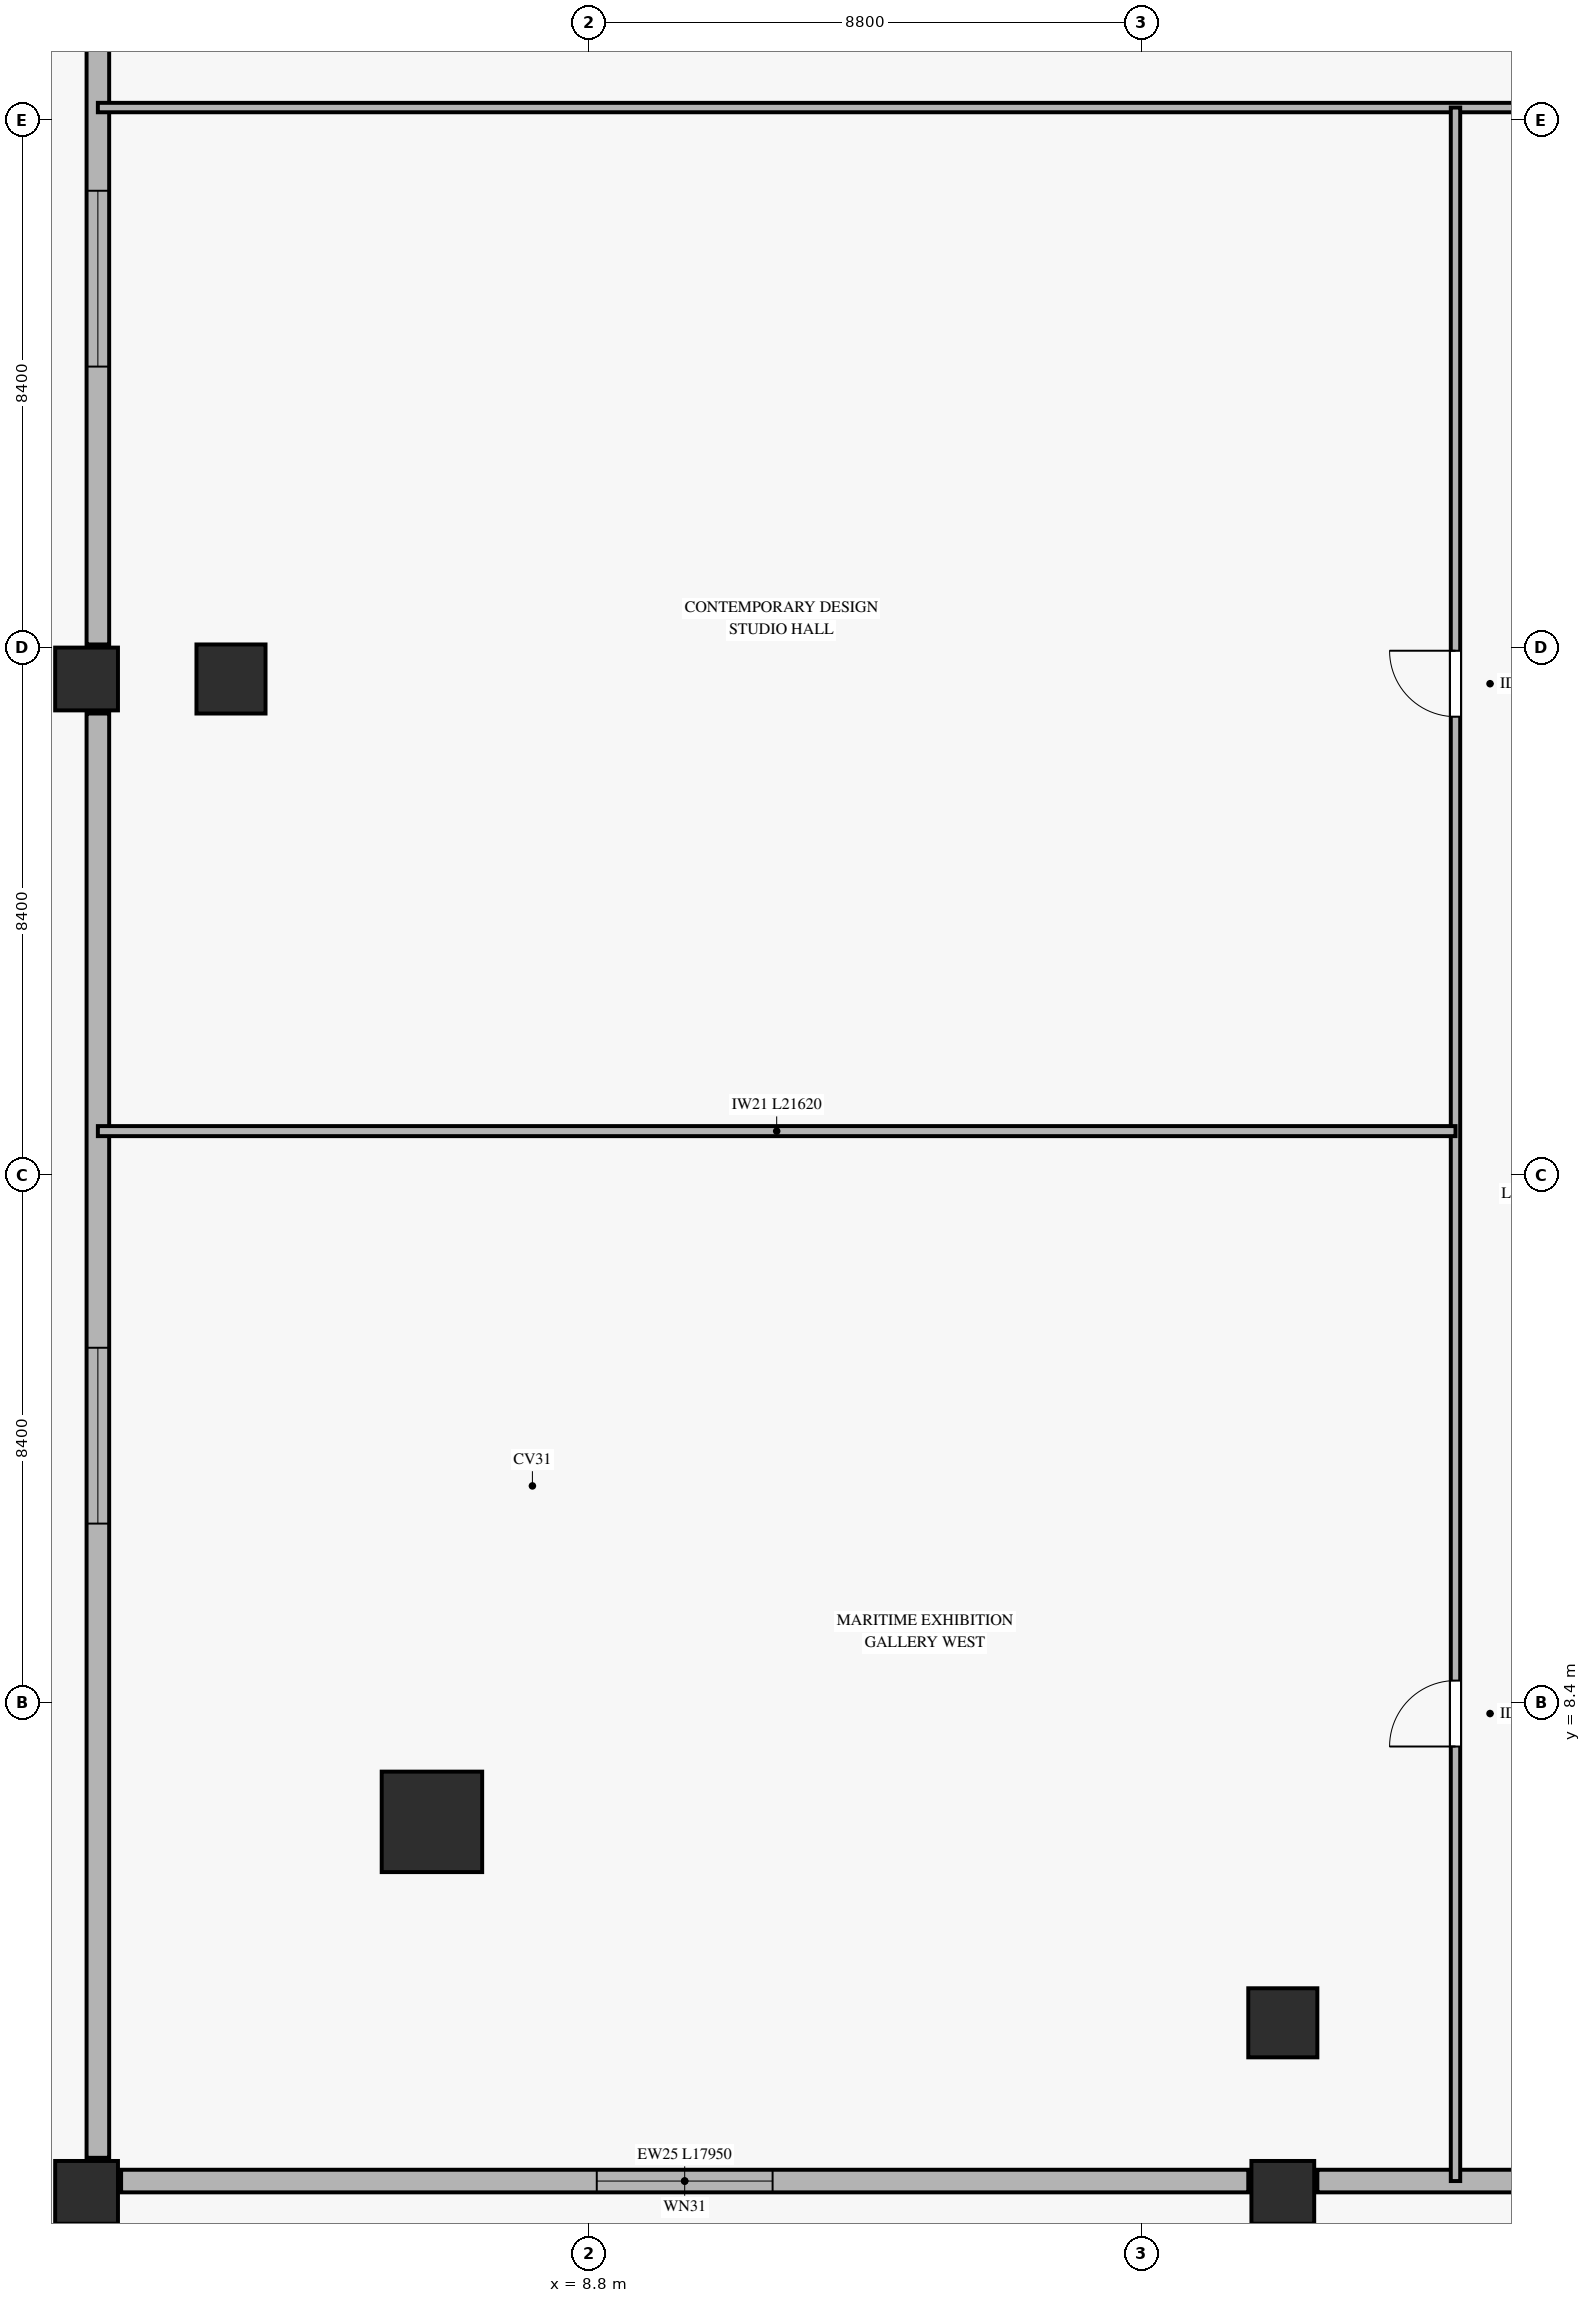
"""IFC4 building model, lengths in metres.
Left out: names, types, materials, properties, quantities, classifications, styles, units other than length and angle.
Written with IfcOpenShell. Run it as: python <this file> out.ifc"""

import sys

from ifc_helpers import new_model, si_unit, direction, frame, frame_2d, origin, origin_2d, place, context, subcontext, project, spatial, rectangle, hollow_rectangle, extrude, source, transform, mapped, element, fill, save


model = new_model("IFC4")
c1 = context("Model", 3, precision=1e-05, world=origin(), true_north=direction((0.0, 1.0)))
c2 = subcontext(c1, "Body", "Model", "MODEL_VIEW")
j1 = project(units=[si_unit("LENGTHUNIT", "METRE"), si_unit("PLANEANGLEUNIT", "RADIAN")], contexts=[c1])
p1 = place(None, origin())
s1 = spatial("IfcSite", under=j1, at=p1, CompositionType="ELEMENT")
p2 = place(p1, origin())
s2 = spatial("IfcBuilding", under=s1, at=p2, CompositionType="ELEMENT")
p3 = place(p2, frame((0.0, 0.0, 10.4)))
s3 = spatial("IfcBuildingStorey", under=s2, at=p3, CompositionType="ELEMENT", Elevation=10.4)
m1 = source(origin(), c2, "Body", "SweptSolid", [
    extrude(hollow_rectangle(XDim=1.6, YDim=1.6, WallThickness=0.075, at=origin_2d()), origin(), (0.0, 0.0, 1.0), 4.54),
])
p4 = place(p3, frame((6.3, 6.5, 0.0), z_axis=(0.0, 0.0, 1.0), x_axis=(1.0, 0.0, 0.0)))
e1 = element("IfcColumn", 1, at=p4, inside=s3, PredefinedType="COLUMN", context=c2, shape_type="MappedRepresentation", body=[
    mapped(m1, transform((0.0, 0.0, 0.0), x_axis=(1.0, 0.0, 0.0), y_axis=(0.0, 1.0, 0.0), z_axis=(0.0, 0.0, 1.0), scale=1.0)),
])
m2 = source(origin(), c2, "Body", "SweptSolid", [
    extrude(hollow_rectangle(XDim=1.1, YDim=1.1, WallThickness=0.05, at=origin_2d()), origin(), (0.0, 0.0, 1.0), 4.54),
])
for number, where, z_axis, x_axis in (
    (2, (19.85, 3.3, 0.0), (0.0, 0.0, 1.0), (1.0, 0.0, 0.0)),
    (3, (3.1, 24.7, 0.0), (0.0, 0.0, 1.0), (1.0, 0.0, 0.0)),
):
    element("IfcColumn", number, at=place(p3, frame(where, z_axis=z_axis, x_axis=x_axis)), inside=s3, PredefinedType="COLUMN", context=c2, shape_type="MappedRepresentation", body=[
        mapped(m2, transform((0.0, 0.0, 0.0), x_axis=(1.0, 0.0, 0.0), y_axis=(0.0, 1.0, 0.0), z_axis=(0.0, 0.0, 1.0), scale=1.0)),
    ])
m3 = source(origin(), c2, "Body", "SweptSolid", [
    extrude(hollow_rectangle(XDim=1.0, YDim=1.0, WallThickness=0.045, at=origin_2d()), origin(), (0.0, 0.0, 1.0), 4.54),
])
for number, where, z_axis, x_axis in (
    (4, (0.8, 0.6, 0.0), (0.0, 0.0, 1.0), (1.0, 0.0, 0.0)),
    (5, (19.85, 0.6, 0.0), (0.0, 0.0, 1.0), (1.0, 0.0, 0.0)),
    (6, (0.8, 24.7, 0.0), (0.0, 0.0, 1.0), (1.0, 0.0, 0.0)),
):
    element("IfcColumn", number, at=place(p3, frame(where, z_axis=z_axis, x_axis=x_axis)), inside=s3, PredefinedType="COLUMN", context=c2, shape_type="MappedRepresentation", body=[
        mapped(m3, transform((0.0, 0.0, 0.0), x_axis=(1.0, 0.0, 0.0), y_axis=(0.0, 1.0, 0.0), z_axis=(0.0, 0.0, 1.0), scale=1.0)),
    ])
p5 = place(p3, frame((1.35, 0.78, 0.0), z_axis=(0.0, 0.0, 1.0), x_axis=(1.0, 0.0, 0.0)))
e7 = element("IfcWall", 7, at=p5, inside=s3, PredefinedType="SOLIDWALL", context=c2, shape_type="SweptSolid", body=[
    extrude(rectangle(XDim=17.95, YDim=0.36, at=frame_2d((8.975, 0.0))), origin(), (0.0, 0.0, 1.0), 3.42),
])
p6 = place(p5, frame((7.575, 0.0, 0.72)))
e8 = element("IfcOpeningElement", 8, at=p6, cuts=e7, PredefinedType="OPENING", context=c2, shape_type="SweptSolid", body=[
    extrude(rectangle(XDim=2.8, YDim=2.0, at=frame_2d((1.4, 1.0))), frame((0.0, 0.19, 0.0), z_axis=(0.0, -1.0, 0.0), x_axis=(1.0, 0.0, 0.0)), (0.0, 0.0, 1.0), 0.38),
])
p7 = place(p3, frame((20.4, 0.78, 0.0), z_axis=(0.0, 0.0, 1.0), x_axis=(1.0, 0.0, 0.0)))
e9 = element("IfcWall", 9, at=p7, inside=s3, PredefinedType="SOLIDWALL", context=c2, shape_type="SweptSolid", body=[
    extrude(rectangle(XDim=9.85, YDim=0.36, at=frame_2d((4.925, 0.0))), origin(), (0.0, 0.0, 1.0), 3.42),
])
p8 = place(p7, frame((5.2, 0.0, 0.72)))
e10 = element("IfcOpeningElement", 10, at=p8, cuts=e9, PredefinedType="OPENING", context=c2, shape_type="SweptSolid", body=[
    extrude(rectangle(XDim=2.8, YDim=2.0, at=frame_2d((1.4, 1.0))), frame((0.0, 0.19, 0.0), z_axis=(0.0, -1.0, 0.0), x_axis=(1.0, 0.0, 0.0)), (0.0, 0.0, 1.0), 0.38),
])
p9 = place(p3, frame((0.98, 1.15, 0.0), z_axis=(0.0, 0.0, 1.0), x_axis=(0.0, 1.0, 0.0)))
e11 = element("IfcWall", 11, at=p9, inside=s3, PredefinedType="SOLIDWALL", context=c2, shape_type="SweptSolid", body=[
    extrude(rectangle(XDim=23.0, YDim=0.36, at=frame_2d((11.5, 0.0))), origin(), (0.0, 0.0, 1.0), 3.42),
])
p10 = place(p9, frame((10.1, 0.0, 0.72)))
e12 = element("IfcOpeningElement", 12, at=p10, cuts=e11, PredefinedType="OPENING", context=c2, shape_type="SweptSolid", body=[
    extrude(rectangle(XDim=2.8, YDim=2.0, at=frame_2d((1.4, 1.0))), frame((0.0, 0.19, 0.0), z_axis=(0.0, -1.0, 0.0), x_axis=(1.0, 0.0, 0.0)), (0.0, 0.0, 1.0), 0.38),
])
p11 = place(p3, frame((0.98, 25.25, 0.0), z_axis=(0.0, 0.0, 1.0), x_axis=(0.0, 1.0, 0.0)))
e13 = element("IfcWall", 13, at=p11, inside=s3, PredefinedType="SOLIDWALL", context=c2, shape_type="SweptSolid", body=[
    extrude(rectangle(XDim=11.65, YDim=0.36, at=frame_2d((5.825, 0.0))), origin(), (0.0, 0.0, 1.0), 3.42),
])
p12 = place(p11, frame((4.425, 0.0, 0.72)))
e14 = element("IfcOpeningElement", 14, at=p12, cuts=e13, PredefinedType="OPENING", context=c2, shape_type="SweptSolid", body=[
    extrude(rectangle(XDim=2.8, YDim=2.0, at=frame_2d((1.4, 1.0))), frame((0.0, 0.19, 0.0), z_axis=(0.0, -1.0, 0.0), x_axis=(1.0, 0.0, 0.0)), (0.0, 0.0, 1.0), 0.38),
])
p13 = place(p3, frame((0.98, 33.8, 0.0), z_axis=(0.0, 0.0, 1.0), x_axis=(1.0, 0.0, 0.0)))
e15 = element("IfcWall", 15, at=p13, inside=s3, PredefinedType="PARTITIONING", context=c2, shape_type="SweptSolid", body=[
    extrude(rectangle(XDim=68.44, YDim=0.15, at=frame_2d((34.22, 0.0))), origin(), (0.0, 0.0, 1.0), 3.425),
])
p14 = place(p13, frame((25.27, 0.0, 0.0)))
e16 = element("IfcOpeningElement", 16, at=p14, cuts=e15, PredefinedType="OPENING", context=c2, shape_type="SweptSolid", body=[
    extrude(rectangle(XDim=1.05, YDim=2.15, at=frame_2d((0.525, 1.075))), frame((0.0, 0.085, 0.0), z_axis=(0.0, -1.0, 0.0), x_axis=(1.0, 0.0, 0.0)), (0.0, 0.0, 1.0), 0.17),
])
p15 = place(p13, frame((38.22, 0.0, 0.0)))
e17 = element("IfcOpeningElement", 17, at=p15, cuts=e15, PredefinedType="OPENING", context=c2, shape_type="SweptSolid", body=[
    extrude(rectangle(XDim=1.05, YDim=2.15, at=frame_2d((0.525, 1.075))), frame((0.0, 0.085, 0.0), z_axis=(0.0, -1.0, 0.0), x_axis=(1.0, 0.0, 0.0)), (0.0, 0.0, 1.0), 0.17),
])
p16 = place(p3, frame((22.6, 0.78, 0.0), z_axis=(0.0, 0.0, 1.0), x_axis=(0.0, 1.0, 0.0)))
e18 = element("IfcWall", 18, at=p16, inside=s3, PredefinedType="PARTITIONING", context=c2, shape_type="SweptSolid", body=[
    extrude(rectangle(XDim=33.02, YDim=0.15, at=frame_2d((16.51, 0.0))), origin(), (0.0, 0.0, 1.0), 3.425),
])
p17 = place(p16, frame((6.92, 0.0, 0.0)))
e19 = element("IfcOpeningElement", 19, at=p17, cuts=e18, PredefinedType="OPENING", context=c2, shape_type="SweptSolid", body=[
    extrude(rectangle(XDim=1.05, YDim=2.15, at=frame_2d((0.525, 1.075))), frame((0.0, 0.085, 0.0), z_axis=(0.0, -1.0, 0.0), x_axis=(1.0, 0.0, 0.0)), (0.0, 0.0, 1.0), 0.17),
])
p18 = place(p16, frame((23.32, 0.0, 0.0)))
e20 = element("IfcOpeningElement", 20, at=p18, cuts=e18, PredefinedType="OPENING", context=c2, shape_type="SweptSolid", body=[
    extrude(rectangle(XDim=1.05, YDim=2.15, at=frame_2d((0.525, 1.075))), frame((0.0, 0.085, 0.0), z_axis=(0.0, -1.0, 0.0), x_axis=(1.0, 0.0, 0.0)), (0.0, 0.0, 1.0), 0.17),
])
p19 = place(p3, frame((0.98, 17.5, 0.0), z_axis=(0.0, 0.0, 1.0), x_axis=(1.0, 0.0, 0.0)))
e21 = element("IfcWall", 21, at=p19, inside=s3, PredefinedType="PARTITIONING", context=c2, shape_type="SweptSolid", body=[
    extrude(rectangle(XDim=21.62, YDim=0.16, at=frame_2d((10.81, 0.0))), origin(), (0.0, 0.0, 1.0), 3.425),
])
m4 = source(origin(), c2, "Body", "SweptSolid", [
    extrude(rectangle(XDim=2.8, YDim=2.0, at=frame_2d((1.4, 1.0))), frame((0.0, 0.03, 0.0), z_axis=(0.0, -1.0, 0.0), x_axis=(1.0, 0.0, 0.0)), (0.0, 0.0, 1.0), 0.06),
])
p20 = place(p6, origin())
e22 = element("IfcWindow", 22, at=p20, inside=s3, PartitioningType="SINGLE_PANEL", PredefinedType="WINDOW", context=c2, shape_type="MappedRepresentation", body=[
    mapped(m4, transform((0.0, 0.0, 0.0), x_axis=(1.0, 0.0, 0.0), y_axis=(0.0, 1.0, 0.0), z_axis=(0.0, 0.0, 1.0), scale=1.0)),
])
fill(e8, e22)
p21 = place(p10, origin())
e23 = element("IfcWindow", 23, at=p21, inside=s3, PartitioningType="SINGLE_PANEL", PredefinedType="WINDOW", context=c2, shape_type="MappedRepresentation", body=[
    mapped(m4, transform((0.0, 0.0, 0.0), x_axis=(1.0, 0.0, 0.0), y_axis=(0.0, 1.0, 0.0), z_axis=(0.0, 0.0, 1.0), scale=1.0)),
])
fill(e12, e23)
p22 = place(p12, origin())
e24 = element("IfcWindow", 24, at=p22, inside=s3, PartitioningType="SINGLE_PANEL", PredefinedType="WINDOW", context=c2, shape_type="MappedRepresentation", body=[
    mapped(m4, transform((0.0, 0.0, 0.0), x_axis=(1.0, 0.0, 0.0), y_axis=(0.0, 1.0, 0.0), z_axis=(0.0, 0.0, 1.0), scale=1.0)),
])
fill(e14, e24)
m5 = source(origin(), c2, "Body", "SweptSolid", [
    extrude(rectangle(XDim=1.05, YDim=2.15, at=frame_2d((0.525, 1.075))), frame((0.0, 0.025, 0.0), z_axis=(0.0, -1.0, 0.0), x_axis=(1.0, 0.0, 0.0)), (0.0, 0.0, 1.0), 0.05),
])
p23 = place(p17, origin())
e25 = element("IfcDoor", 25, at=p23, inside=s3, OperationType="SINGLE_SWING_LEFT", PredefinedType="DOOR", context=c2, shape_type="MappedRepresentation", body=[
    mapped(m5, transform((0.0, 0.0, 0.0), x_axis=(1.0, 0.0, 0.0), y_axis=(0.0, 1.0, 0.0), z_axis=(0.0, 0.0, 1.0), scale=1.0)),
])
fill(e19, e25)
p24 = place(p18, origin())
e26 = element("IfcDoor", 26, at=p24, inside=s3, OperationType="SINGLE_SWING_RIGHT", PredefinedType="DOOR", context=c2, shape_type="MappedRepresentation", body=[
    mapped(m5, transform((0.0, 0.0, 0.0), x_axis=(1.0, 0.0, 0.0), y_axis=(0.0, 1.0, 0.0), z_axis=(0.0, 0.0, 1.0), scale=1.0)),
])
fill(e20, e26)
save(model, sys.argv[1])
